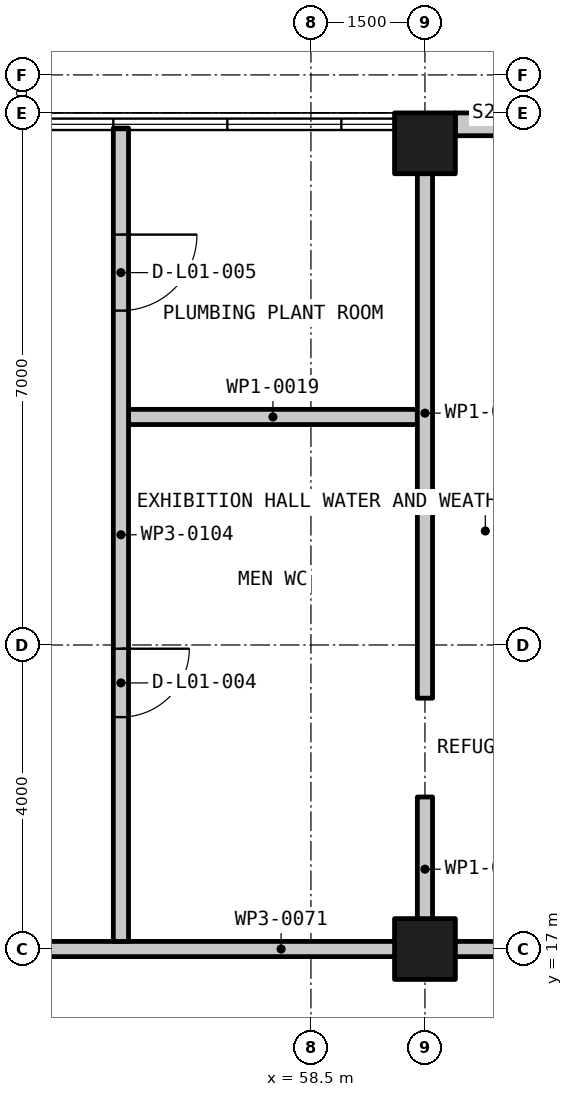
"""IFC4 building model, lengths in metres.
Left out: names, types, materials, properties, quantities, classifications, styles, units other than length and angle.
Written with IfcOpenShell. Run it as: python <this file> out.ifc"""

import sys

from ifc_helpers import new_model, si_unit, direction, frame, frame_2d, origin, origin_2d, place, context, subcontext, project, spatial, rectangle, extrude, element, fill, save


model = new_model("IFC4")
c1 = context("Model", 3, precision=1e-05, world=origin(), true_north=direction((0.0, 1.0)))
c2 = subcontext(c1, "Body", "Model", "MODEL_VIEW")
j1 = project(units=[si_unit("LENGTHUNIT", "METRE"), si_unit("PLANEANGLEUNIT", "RADIAN")], contexts=[c1])
p1 = place(None, origin())
s1 = spatial("IfcSite", under=j1, at=p1, CompositionType="ELEMENT")
p2 = place(p1, origin())
s2 = spatial("IfcBuilding", under=s1, at=p2, CompositionType="ELEMENT")
p3 = place(p2, frame((0.0, 0.0, 6.0)))
s3 = spatial("IfcBuildingStorey", under=s2, at=p3, CompositionType="ELEMENT", Elevation=6.0)
for number, where, z_axis, x_axis in (
    (1, (60.0, 17.0, -0.3), (0.0, 0.0, 1.0), (1.0, 0.0, 0.0)),
    (2, (60.0, 27.6, -0.3), (0.0, 0.0, 1.0), (1.0, 0.0, 0.0)),
):
    element("IfcColumn", number, at=place(p3, frame(where, z_axis=z_axis, x_axis=x_axis)), inside=s3, PredefinedType="COLUMN", context=c2, shape_type="SweptSolid", body=[
        extrude(rectangle(XDim=0.8, YDim=0.8, at=origin_2d()), origin(), (0.0, 0.0, 1.0), 5.25),
    ])
p4 = place(p3, frame((60.4, 27.85, 0.0), z_axis=(0.0, 0.0, 1.0), x_axis=(1.0, 0.0, 0.0)))
e3 = element("IfcWall", 3, at=p4, inside=s3, PredefinedType="SOLIDWALL", context=c2, shape_type="SweptSolid", body=[
    extrude(rectangle(XDim=10.8, YDim=0.3, at=frame_2d((5.4, 0.0))), origin(), (0.0, 0.0, 1.0), 4.05),
])
p5 = place(p3, frame((65.9, 17.0, 0.0), z_axis=(0.0, 0.0, 1.0), x_axis=(-1.0, 0.0, 0.0)))
e4 = element("IfcWall", 4, at=p5, inside=s3, PredefinedType="PARTITIONING", context=c2, shape_type="SweptSolid", body=[
    extrude(rectangle(XDim=60.0, YDim=0.2, at=frame_2d((30.0, 0.0))), origin(), (0.0, 0.0, 1.0), 4.05),
])
p6 = place(p5, frame((50.75, 0.0, 0.0)))
e5 = element("IfcOpeningElement", 5, at=p6, cuts=e4, PredefinedType="OPENING", context=c2, shape_type="SweptSolid", body=[
    extrude(rectangle(XDim=1.5, YDim=2.1, at=frame_2d((0.75, 1.05))), frame((0.0, 0.11, 0.0), z_axis=(0.0, -1.0, 0.0), x_axis=(1.0, 0.0, 0.0)), (0.0, 0.0, 1.0), 0.22),
])
p7 = place(p5, frame((37.401, 0.0, 0.0)))
e6 = element("IfcOpeningElement", 6, at=p7, cuts=e4, PredefinedType="OPENING", context=c2, shape_type="SweptSolid", body=[
    extrude(rectangle(XDim=2.0, YDim=2.1, at=frame_2d((1.0, 1.05))), frame((0.0, 0.11, 0.0), z_axis=(0.0, -1.0, 0.0), x_axis=(1.0, 0.0, 0.0)), (0.0, 0.0, 1.0), 0.22),
])
p8 = place(p5, frame((11.15, 0.0, 0.0)))
e7 = element("IfcOpeningElement", 7, at=p8, cuts=e4, PredefinedType="OPENING", context=c2, shape_type="SweptSolid", body=[
    extrude(rectangle(XDim=1.5, YDim=2.1, at=frame_2d((0.75, 1.05))), frame((0.0, 0.11, 0.0), z_axis=(0.0, -1.0, 0.0), x_axis=(1.0, 0.0, 0.0)), (0.0, 0.0, 1.0), 0.22),
])
p9 = place(p5, frame((2.251, 0.0, 0.0)))
e8 = element("IfcOpeningElement", 8, at=p9, cuts=e4, PredefinedType="OPENING", context=c2, shape_type="SweptSolid", body=[
    extrude(rectangle(XDim=2.0, YDim=2.1, at=frame_2d((1.0, 1.05))), frame((0.0, 0.11, 0.0), z_axis=(0.0, -1.0, 0.0), x_axis=(1.0, 0.0, 0.0)), (0.0, 0.0, 1.0), 0.22),
])
p10 = place(p3, frame((56.1, 24.0, 0.0), z_axis=(0.0, 0.0, 1.0), x_axis=(1.0, 0.0, 0.0)))
e9 = element("IfcWall", 9, at=p10, inside=s3, PredefinedType="PARTITIONING", context=c2, shape_type="SweptSolid", body=[
    extrude(rectangle(XDim=3.8, YDim=0.2, at=frame_2d((1.9, 0.0))), origin(), (0.0, 0.0, 1.0), 4.05),
])
p11 = place(p3, frame((60.0, 17.1, 0.0), z_axis=(0.0, 0.0, 1.0), x_axis=(0.0, 1.0, 0.0)))
e10 = element("IfcWall", 10, at=p11, inside=s3, PredefinedType="PARTITIONING", context=c2, shape_type="SweptSolid", body=[
    extrude(rectangle(XDim=1.9, YDim=0.2, at=frame_2d((0.95, 0.0))), origin(), (0.0, 0.0, 1.0), 4.05),
])
p12 = place(p3, frame((60.0, 20.3, 0.0), z_axis=(0.0, 0.0, 1.0), x_axis=(0.0, 1.0, 0.0)))
e11 = element("IfcWall", 11, at=p12, inside=s3, PredefinedType="PARTITIONING", context=c2, shape_type="SweptSolid", body=[
    extrude(rectangle(XDim=7.5, YDim=0.2, at=frame_2d((3.75, 0.0))), origin(), (0.0, 0.0, 1.0), 4.05),
])
p13 = place(p3, frame((56.0, 27.8, 0.0), z_axis=(0.0, 0.0, 1.0), x_axis=(0.0, -1.0, 0.0)))
e12 = element("IfcWall", 12, at=p13, inside=s3, PredefinedType="PARTITIONING", context=c2, shape_type="SweptSolid", body=[
    extrude(rectangle(XDim=10.7, YDim=0.2, at=frame_2d((5.35, 0.0))), origin(), (0.0, 0.0, 1.0), 4.05),
])
p14 = place(p13, frame((6.849, 0.0, 0.0)))
e13 = element("IfcOpeningElement", 13, at=p14, cuts=e12, PredefinedType="OPENING", context=c2, shape_type="SweptSolid", body=[
    extrude(rectangle(XDim=0.9, YDim=2.1, at=frame_2d((0.45, 1.05))), frame((0.0, 0.11, 0.0), z_axis=(0.0, -1.0, 0.0), x_axis=(1.0, 0.0, 0.0)), (0.0, 0.0, 1.0), 0.22),
])
p15 = place(p13, frame((1.401, 0.0, 0.0)))
e14 = element("IfcOpeningElement", 14, at=p15, cuts=e12, PredefinedType="OPENING", context=c2, shape_type="SweptSolid", body=[
    extrude(rectangle(XDim=1.0, YDim=2.1, at=frame_2d((0.5, 1.05))), frame((0.0, 0.11, 0.0), z_axis=(0.0, -1.0, 0.0), x_axis=(1.0, 0.0, 0.0)), (0.0, 0.0, 1.0), 0.22),
])
p16 = place(p14, origin())
e15 = element("IfcDoor", 15, at=p16, inside=s3, OperationType="SINGLE_SWING_LEFT", PredefinedType="DOOR", context=c2, shape_type="SweptSolid", body=[
    extrude(rectangle(XDim=0.9, YDim=2.1, at=frame_2d((0.45, 1.05))), frame((0.0, 0.025, 0.0), z_axis=(0.0, -1.0, 0.0), x_axis=(1.0, 0.0, 0.0)), (0.0, 0.0, 1.0), 0.05),
])
fill(e13, e15)
p17 = place(p15, origin())
e16 = element("IfcDoor", 16, at=p17, inside=s3, OperationType="SINGLE_SWING_RIGHT", PredefinedType="DOOR", context=c2, shape_type="SweptSolid", body=[
    extrude(rectangle(XDim=1.0, YDim=2.1, at=frame_2d((0.5, 1.05))), frame((0.0, 0.025, 0.0), z_axis=(0.0, -1.0, 0.0), x_axis=(1.0, 0.0, 0.0)), (0.0, 0.0, 1.0), 0.05),
])
fill(e14, e16)
save(model, sys.argv[1])
